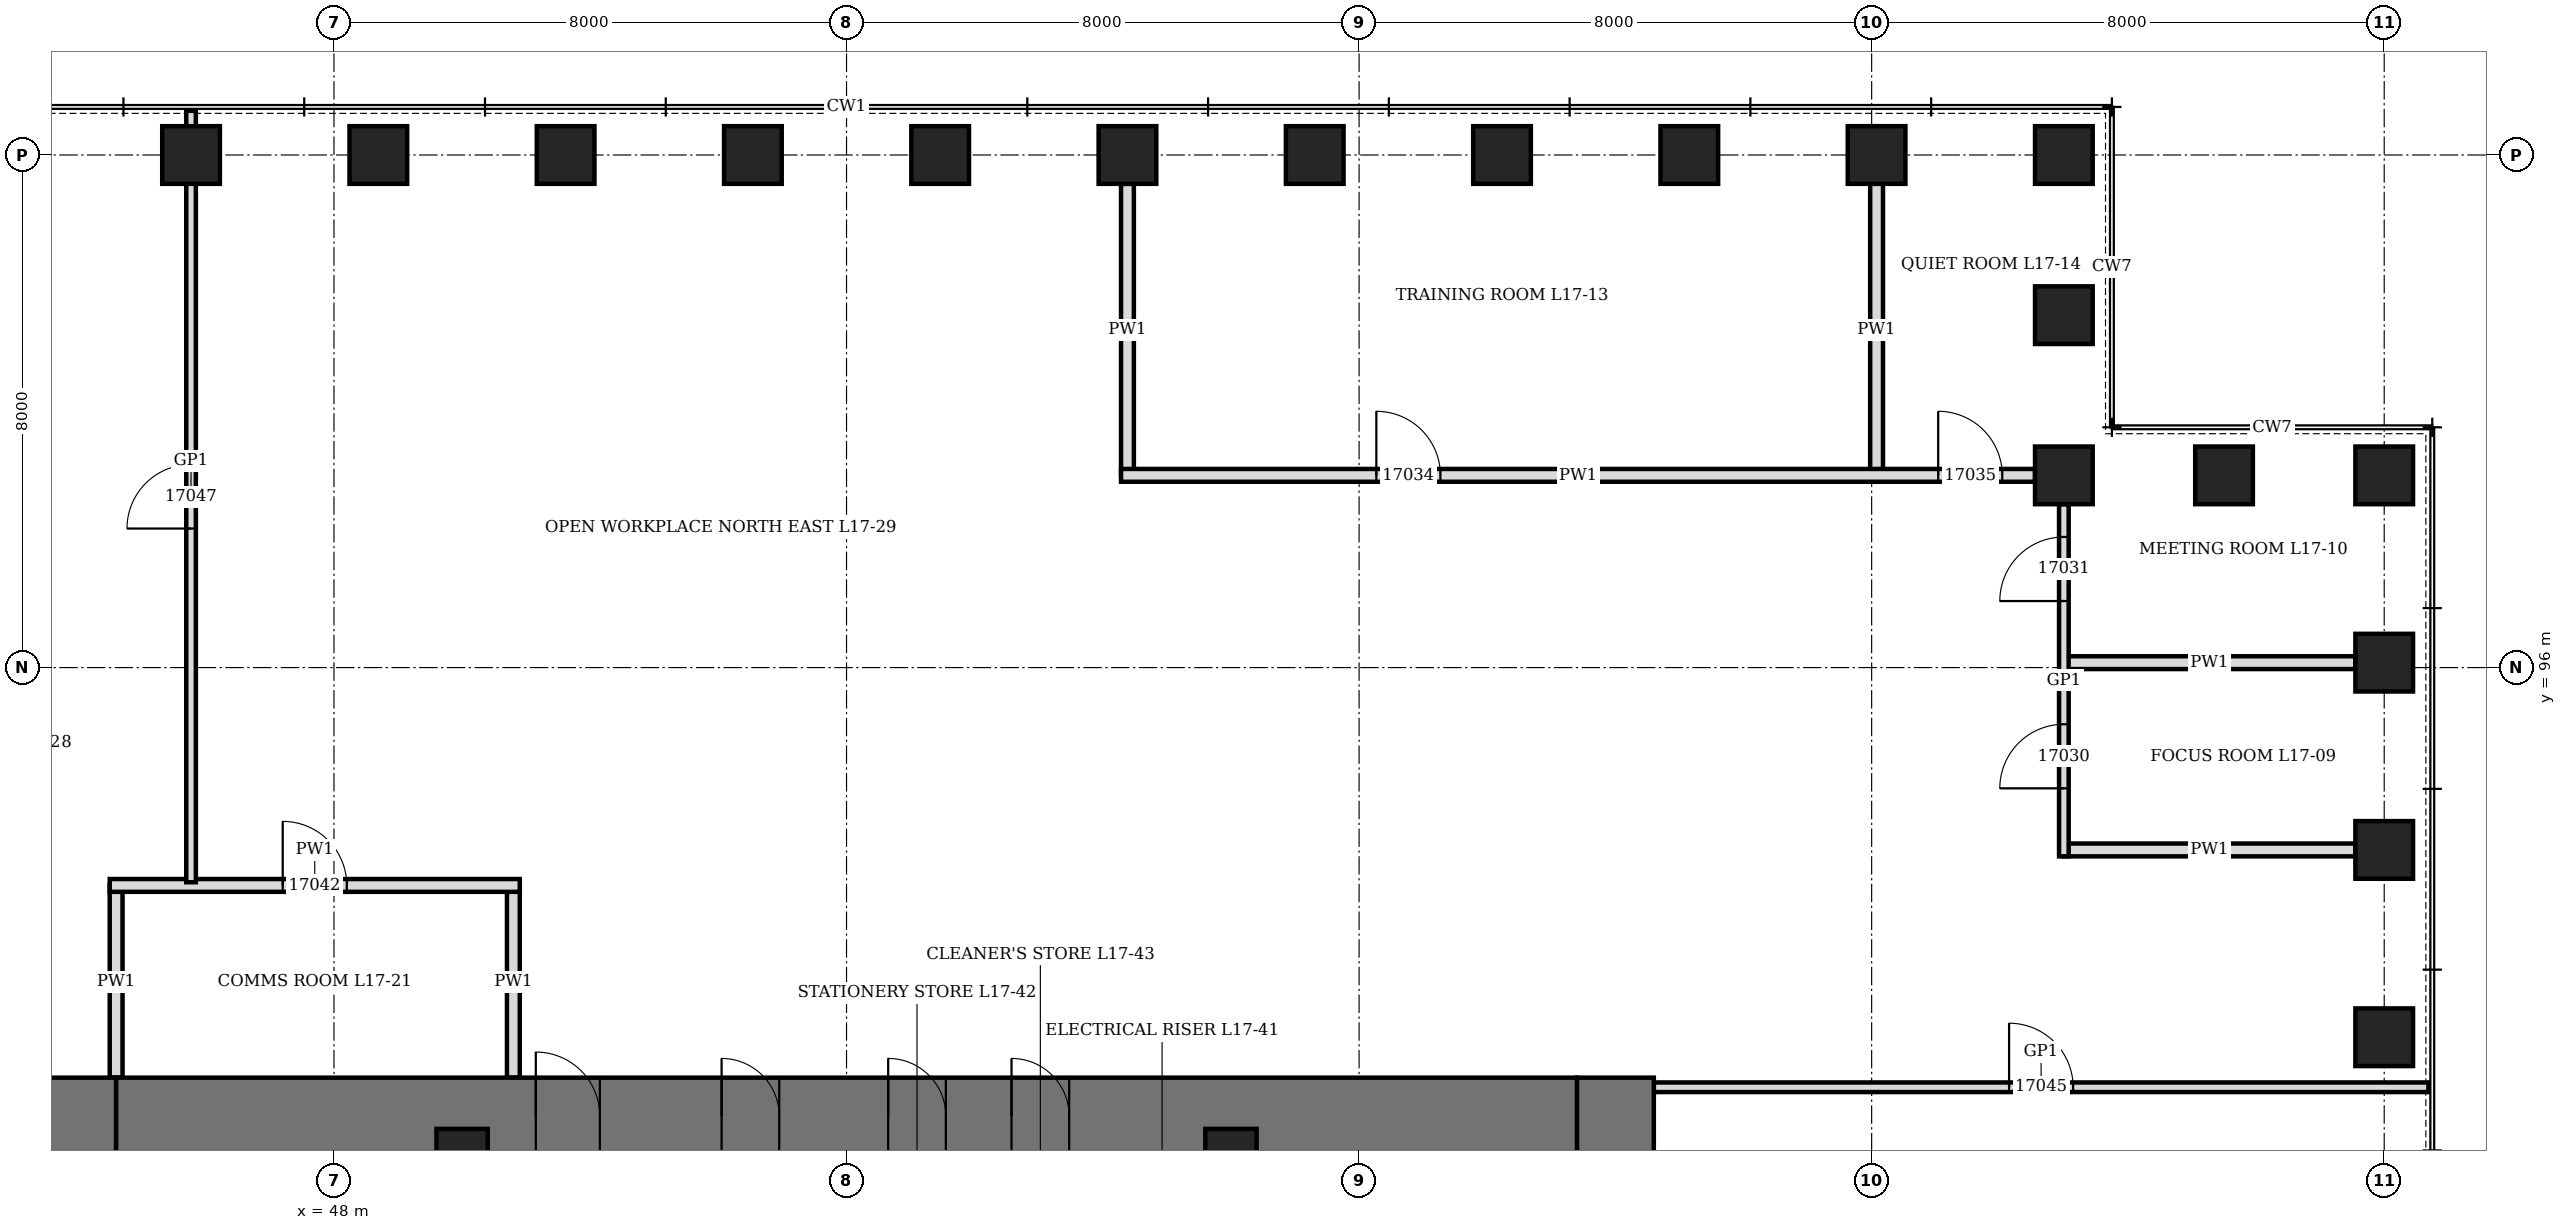
"""IFC4 building model, lengths in metres.
Left out: names, types, materials, properties, quantities, classifications, styles, units other than length and angle.
Written with IfcOpenShell. Run it as: python <this file> out.ifc"""

import sys

from ifc_helpers import new_model, si_unit, direction, frame, frame_2d, origin, origin_2d, place, context, subcontext, project, spatial, rectangle, hollow_rectangle, extrude, element, fill, save


model = new_model("IFC4")
c1 = context("Model", 3, precision=1e-05, world=origin(), true_north=direction((0.0, 1.0)))
c2 = subcontext(c1, "Body", "Model", "MODEL_VIEW")
j1 = project(units=[si_unit("LENGTHUNIT", "METRE"), si_unit("PLANEANGLEUNIT", "RADIAN")], contexts=[c1])
p1 = place(None, origin())
s1 = spatial("IfcSite", under=j1, at=p1, CompositionType="ELEMENT")
p2 = place(p1, origin())
s2 = spatial("IfcBuilding", under=s1, at=p2, CompositionType="ELEMENT")
p3 = place(p2, frame((0.0, 0.0, 81.1)))
s3 = spatial("IfcBuildingStorey", under=s2, at=p3, CompositionType="ELEMENT", Elevation=81.1)
for number, where, z_axis, x_axis in (
    (1, (80.0, 90.231, 0.0), (0.0, 0.0, 1.0), (0.0, 1.0, 0.0)),
    (2, (80.0, 93.154, 0.0), (0.0, 0.0, 1.0), (0.0, 1.0, 0.0)),
    (3, (80.0, 96.077, 0.0), (0.0, 0.0, 1.0), (0.0, 1.0, 0.0)),
    (4, (80.0, 99.0, 0.0), (0.0, 0.0, 1.0), (1.0, 0.0, 0.0)),
    (5, (77.5, 99.0, 0.0), (0.0, 0.0, 1.0), (1.0, 0.0, 0.0)),
    (6, (75.0, 99.0, 0.0), (0.0, 0.0, 1.0), (0.0, 1.0, 0.0)),
    (7, (75.0, 101.5, 0.0), (0.0, 0.0, 1.0), (0.0, 1.0, 0.0)),
    (8, (75.0, 104.0, 0.0), (0.0, 0.0, 1.0), (1.0, 0.0, 0.0)),
    (9, (72.077, 104.0, 0.0), (0.0, 0.0, 1.0), (1.0, 0.0, 0.0)),
    (10, (69.154, 104.0, 0.0), (0.0, 0.0, 1.0), (1.0, 0.0, 0.0)),
    (11, (66.231, 104.0, 0.0), (0.0, 0.0, 1.0), (1.0, 0.0, 0.0)),
    (12, (63.308, 104.0, 0.0), (0.0, 0.0, 1.0), (1.0, 0.0, 0.0)),
    (13, (60.385, 104.0, 0.0), (0.0, 0.0, 1.0), (1.0, 0.0, 0.0)),
    (14, (57.461, 104.0, 0.0), (0.0, 0.0, 1.0), (1.0, 0.0, 0.0)),
    (15, (54.539, 104.0, 0.0), (0.0, 0.0, 1.0), (1.0, 0.0, 0.0)),
    (16, (51.615, 104.0, 0.0), (0.0, 0.0, 1.0), (1.0, 0.0, 0.0)),
    (17, (48.692, 104.0, 0.0), (0.0, 0.0, 1.0), (1.0, 0.0, 0.0)),
    (18, (45.769, 104.0, 0.0), (0.0, 0.0, 1.0), (1.0, 0.0, 0.0)),
):
    element("IfcColumn", number, at=place(p3, frame(where, z_axis=z_axis, x_axis=x_axis)), inside=s3, PredefinedType="COLUMN", context=c2, shape_type="SweptSolid", body=[
        extrude(hollow_rectangle(XDim=0.9, YDim=0.9, WallThickness=0.12, at=origin_2d()), origin(), (0.0, 0.0, 1.0), 4.2),
    ])
p4 = place(p3, frame((44.0, 70.4, 0.0), z_axis=(0.0, 0.0, 1.0), x_axis=(0.0, 1.0, 0.0)))
e19 = element("IfcWall", 19, at=p4, inside=s3, PredefinedType="SHEAR", context=c2, shape_type="SweptSolid", body=[
    extrude(rectangle(XDim=19.2, YDim=1.2, at=frame_2d((9.6, 0.0))), origin(), (0.0, 0.0, 1.0), 4.2),
])
p5 = place(p4, frame((8.6, 0.0, 0.0)))
e20 = element("IfcOpeningElement", 20, at=p5, cuts=e19, PredefinedType="OPENING", context=c2, shape_type="SweptSolid", body=[
    extrude(rectangle(XDim=2.0, YDim=2.4, at=frame_2d((1.0, 1.2))), frame((0.0, 0.61, 0.0), z_axis=(0.0, -1.0, 0.0), x_axis=(1.0, 0.0, 0.0)), (0.0, 0.0, 1.0), 1.22),
])
p6 = place(p3, frame((68.0, 70.4, 0.0), z_axis=(0.0, 0.0, 1.0), x_axis=(0.0, 1.0, 0.0)))
e21 = element("IfcWall", 21, at=p6, inside=s3, PredefinedType="SHEAR", context=c2, shape_type="SweptSolid", body=[
    extrude(rectangle(XDim=19.2, YDim=1.2, at=frame_2d((9.6, 0.0))), origin(), (0.0, 0.0, 1.0), 4.2),
])
p7 = place(p6, frame((8.6, 0.0, 0.0)))
e22 = element("IfcOpeningElement", 22, at=p7, cuts=e21, PredefinedType="OPENING", context=c2, shape_type="SweptSolid", body=[
    extrude(rectangle(XDim=2.0, YDim=2.4, at=frame_2d((1.0, 1.2))), frame((0.0, 0.61, 0.0), z_axis=(0.0, -1.0, 0.0), x_axis=(1.0, 0.0, 0.0)), (0.0, 0.0, 1.0), 1.22),
])
p8 = place(p3, frame((44.6, 89.0, 0.0), z_axis=(0.0, 0.0, 1.0), x_axis=(1.0, 0.0, 0.0)))
e23 = element("IfcWall", 23, at=p8, inside=s3, PredefinedType="SHEAR", context=c2, shape_type="SweptSolid", body=[
    extrude(rectangle(XDim=22.8, YDim=1.2, at=frame_2d((11.4, 0.0))), origin(), (0.0, 0.0, 1.0), 4.2),
])
p9 = place(p8, frame((6.55, 0.0, 0.0)))
e24 = element("IfcOpeningElement", 24, at=p9, cuts=e23, PredefinedType="OPENING", context=c2, shape_type="SweptSolid", body=[
    extrude(rectangle(XDim=1.0, YDim=2.1, at=frame_2d((0.5, 1.05))), frame((0.0, 0.61, 0.0), z_axis=(0.0, -1.0, 0.0), x_axis=(1.0, 0.0, 0.0)), (0.0, 0.0, 1.0), 1.22),
])
p10 = place(p8, frame((9.45, 0.0, 0.0)))
e25 = element("IfcOpeningElement", 25, at=p10, cuts=e23, PredefinedType="OPENING", context=c2, shape_type="SweptSolid", body=[
    extrude(rectangle(XDim=0.9, YDim=2.1, at=frame_2d((0.45, 1.05))), frame((0.0, 0.61, 0.0), z_axis=(0.0, -1.0, 0.0), x_axis=(1.0, 0.0, 0.0)), (0.0, 0.0, 1.0), 1.22),
])
p11 = place(p8, frame((12.05, 0.0, 0.0)))
e26 = element("IfcOpeningElement", 26, at=p11, cuts=e23, PredefinedType="OPENING", context=c2, shape_type="SweptSolid", body=[
    extrude(rectangle(XDim=0.9, YDim=2.1, at=frame_2d((0.45, 1.05))), frame((0.0, 0.61, 0.0), z_axis=(0.0, -1.0, 0.0), x_axis=(1.0, 0.0, 0.0)), (0.0, 0.0, 1.0), 1.22),
])
p12 = place(p8, frame((13.975, 0.0, 0.0)))
e27 = element("IfcOpeningElement", 27, at=p12, cuts=e23, PredefinedType="OPENING", context=c2, shape_type="SweptSolid", body=[
    extrude(rectangle(XDim=0.9, YDim=2.1, at=frame_2d((0.45, 1.05))), frame((0.0, 0.61, 0.0), z_axis=(0.0, -1.0, 0.0), x_axis=(1.0, 0.0, 0.0)), (0.0, 0.0, 1.0), 1.22),
])
for number, where, z_axis, x_axis in (
    (28, (50.0, 88.4, 0.0), (0.0, 0.0, 1.0), (1.0, 0.0, 0.0)),
    (29, (62.0, 88.4, 0.0), (0.0, 0.0, 1.0), (1.0, 0.0, 0.0)),
):
    element("IfcColumn", number, at=place(p3, frame(where, z_axis=z_axis, x_axis=x_axis)), inside=s3, PredefinedType="COLUMN", context=c2, shape_type="SweptSolid", body=[
        extrude(hollow_rectangle(XDim=0.8, YDim=0.8, WallThickness=0.1, at=origin_2d()), origin(), (0.0, 0.0, 1.0), 4.2),
    ])
for number, where, z_axis, x_axis in (
    (30, (75.0, 93.154, 0.0), (0.0, 0.0, 1.0), (1.0, 0.0, 0.0)),
    (31, (75.0, 96.077, 0.0), (0.0, 0.0, 1.0), (1.0, 0.0, 0.0)),
):
    element("IfcWall", number, at=place(p3, frame(where, z_axis=z_axis, x_axis=x_axis)), inside=s3, PredefinedType="PARTITIONING", context=c2, shape_type="SweptSolid", body=[
        extrude(rectangle(XDim=4.55, YDim=0.2, at=frame_2d((2.275, 0.0))), origin(), (0.0, 0.0, 1.0), 3.428),
    ])
p13 = place(p3, frame((60.385, 99.0, 0.0), z_axis=(0.0, 0.0, 1.0), x_axis=(0.0, 1.0, 0.0)))
e32 = element("IfcWall", 32, at=p13, inside=s3, PredefinedType="PARTITIONING", context=c2, shape_type="SweptSolid", body=[
    extrude(rectangle(XDim=4.55, YDim=0.2, at=frame_2d((2.275, 0.0))), origin(), (0.0, 0.0, 1.0), 3.278),
])
p14 = place(p3, frame((72.077, 99.0, 0.0), z_axis=(0.0, 0.0, 1.0), x_axis=(0.0, 1.0, 0.0)))
e33 = element("IfcWall", 33, at=p14, inside=s3, PredefinedType="PARTITIONING", context=c2, shape_type="SweptSolid", body=[
    extrude(rectangle(XDim=4.55, YDim=0.2, at=frame_2d((2.275, 0.0))), origin(), (0.0, 0.0, 1.0), 3.428),
])
for number, where, z_axis, x_axis in (
    (34, (44.6, 89.6, 0.0), (0.0, 0.0, 1.0), (0.0, 1.0, 0.0)),
    (35, (50.8, 89.6, 0.0), (0.0, 0.0, 1.0), (0.0, 1.0, 0.0)),
):
    element("IfcWall", number, at=place(p3, frame(where, z_axis=z_axis, x_axis=x_axis)), inside=s3, PredefinedType="PARTITIONING", context=c2, shape_type="SweptSolid", body=[
        extrude(rectangle(XDim=3.0, YDim=0.2, at=frame_2d((1.5, 0.0))), origin(), (0.0, 0.0, 1.0), 4.04),
    ])
p15 = place(p3, frame((68.6, 89.45, 0.0), z_axis=(0.0, 0.0, 1.0), x_axis=(1.0, 0.0, 0.0)))
e36 = element("IfcWall", 36, at=p15, inside=s3, PredefinedType="PARTITIONING", context=c2, shape_type="SweptSolid", body=[
    extrude(rectangle(XDim=12.09, YDim=0.15, at=frame_2d((6.045, 0.0))), origin(), (0.0, 0.0, 1.0), 4.04),
])
p16 = place(p15, frame((5.545, 0.0, 0.0)))
e37 = element("IfcOpeningElement", 37, at=p16, cuts=e36, PredefinedType="OPENING", context=c2, shape_type="SweptSolid", body=[
    extrude(rectangle(XDim=1.0, YDim=2.4, at=frame_2d((0.5, 1.2))), frame((0.0, 0.085, 0.0), z_axis=(0.0, -1.0, 0.0), x_axis=(1.0, 0.0, 0.0)), (0.0, 0.0, 1.0), 0.17),
])
p17 = place(p3, frame((44.5, 92.6, 0.0), z_axis=(0.0, 0.0, 1.0), x_axis=(1.0, 0.0, 0.0)))
e38 = element("IfcWall", 38, at=p17, inside=s3, PredefinedType="PARTITIONING", context=c2, shape_type="SweptSolid", body=[
    extrude(rectangle(XDim=6.4, YDim=0.2, at=frame_2d((3.2, 0.0))), origin(), (0.0, 0.0, 1.0), 4.04),
])
p18 = place(p17, frame((2.7, 0.0, 0.0)))
e39 = element("IfcOpeningElement", 39, at=p18, cuts=e38, PredefinedType="OPENING", context=c2, shape_type="SweptSolid", body=[
    extrude(rectangle(XDim=1.0, YDim=2.1, at=frame_2d((0.5, 1.05))), frame((0.0, 0.11, 0.0), z_axis=(0.0, -1.0, 0.0), x_axis=(1.0, 0.0, 0.0)), (0.0, 0.0, 1.0), 0.22),
])
p19 = place(p3, frame((60.285, 99.0, 0.0), z_axis=(0.0, 0.0, 1.0), x_axis=(1.0, 0.0, 0.0)))
e40 = element("IfcWall", 40, at=p19, inside=s3, PredefinedType="PARTITIONING", context=c2, shape_type="SweptSolid", body=[
    extrude(rectangle(XDim=14.265, YDim=0.2, at=frame_2d((7.133, 0.0))), origin(), (0.0, 0.0, 1.0), 4.04),
])
p20 = place(p19, frame((3.985, 0.0, 0.0)))
e41 = element("IfcOpeningElement", 41, at=p20, cuts=e40, PredefinedType="OPENING", context=c2, shape_type="SweptSolid", body=[
    extrude(rectangle(XDim=1.0, YDim=2.1, at=frame_2d((0.5, 1.05))), frame((0.0, 0.11, 0.0), z_axis=(0.0, -1.0, 0.0), x_axis=(1.0, 0.0, 0.0)), (0.0, 0.0, 1.0), 0.22),
])
p21 = place(p19, frame((12.754, 0.0, 0.0)))
e42 = element("IfcOpeningElement", 42, at=p21, cuts=e40, PredefinedType="OPENING", context=c2, shape_type="SweptSolid", body=[
    extrude(rectangle(XDim=1.0, YDim=2.1, at=frame_2d((0.5, 1.05))), frame((0.0, 0.11, 0.0), z_axis=(0.0, -1.0, 0.0), x_axis=(1.0, 0.0, 0.0)), (0.0, 0.0, 1.0), 0.22),
])
p22 = place(p3, frame((45.769, 92.65, 0.0), z_axis=(0.0, 0.0, 1.0), x_axis=(0.0, 1.0, 0.0)))
e43 = element("IfcWall", 43, at=p22, inside=s3, PredefinedType="PARTITIONING", context=c2, shape_type="SweptSolid", body=[
    extrude(rectangle(XDim=12.04, YDim=0.15, at=frame_2d((6.02, 0.0))), origin(), (0.0, 0.0, 1.0), 3.278),
])
p23 = place(p22, frame((5.52, 0.0, 0.0)))
e44 = element("IfcOpeningElement", 44, at=p23, cuts=e43, PredefinedType="OPENING", context=c2, shape_type="SweptSolid", body=[
    extrude(rectangle(XDim=1.0, YDim=2.4, at=frame_2d((0.5, 1.2))), frame((0.0, 0.085, 0.0), z_axis=(0.0, -1.0, 0.0), x_axis=(1.0, 0.0, 0.0)), (0.0, 0.0, 1.0), 0.17),
])
p24 = place(p3, frame((75.0, 93.054, 0.0), z_axis=(0.0, 0.0, 1.0), x_axis=(0.0, 1.0, 0.0)))
e45 = element("IfcWall", 45, at=p24, inside=s3, PredefinedType="PARTITIONING", context=c2, shape_type="SweptSolid", body=[
    extrude(rectangle(XDim=5.496, YDim=0.15, at=frame_2d((2.748, 0.0))), origin(), (0.0, 0.0, 1.0), 4.04),
])
p25 = place(p24, frame((1.062, 0.0, 0.0)))
e46 = element("IfcOpeningElement", 46, at=p25, cuts=e45, PredefinedType="OPENING", context=c2, shape_type="SweptSolid", body=[
    extrude(rectangle(XDim=1.0, YDim=2.4, at=frame_2d((0.5, 1.2))), frame((0.0, 0.085, 0.0), z_axis=(0.0, -1.0, 0.0), x_axis=(1.0, 0.0, 0.0)), (0.0, 0.0, 1.0), 0.17),
])
p26 = place(p24, frame((3.985, 0.0, 0.0)))
e47 = element("IfcOpeningElement", 47, at=p26, cuts=e45, PredefinedType="OPENING", context=c2, shape_type="SweptSolid", body=[
    extrude(rectangle(XDim=1.0, YDim=2.4, at=frame_2d((0.5, 1.2))), frame((0.0, 0.085, 0.0), z_axis=(0.0, -1.0, 0.0), x_axis=(1.0, 0.0, 0.0)), (0.0, 0.0, 1.0), 0.17),
])
p27 = place(p9, origin())
e48 = element("IfcDoor", 48, at=p27, inside=s3, OperationType="SINGLE_SWING_LEFT", PredefinedType="DOOR", context=c2, shape_type="SweptSolid", body=[
    extrude(rectangle(XDim=1.0, YDim=2.1, at=frame_2d((0.5, 1.05))), frame((0.0, 0.35, 0.0), z_axis=(0.0, -1.0, 0.0), x_axis=(1.0, 0.0, 0.0)), (0.0, 0.0, 1.0), 0.7),
])
fill(e24, e48)
p28 = place(p10, origin())
e49 = element("IfcDoor", 49, at=p28, inside=s3, OperationType="SINGLE_SWING_LEFT", PredefinedType="DOOR", context=c2, shape_type="SweptSolid", body=[
    extrude(rectangle(XDim=0.9, YDim=2.1, at=frame_2d((0.45, 1.05))), frame((0.0, 0.35, 0.0), z_axis=(0.0, -1.0, 0.0), x_axis=(1.0, 0.0, 0.0)), (0.0, 0.0, 1.0), 0.7),
])
fill(e25, e49)
p29 = place(p11, origin())
e50 = element("IfcDoor", 50, at=p29, inside=s3, OperationType="SINGLE_SWING_LEFT", PredefinedType="DOOR", context=c2, shape_type="SweptSolid", body=[
    extrude(rectangle(XDim=0.9, YDim=2.1, at=frame_2d((0.45, 1.05))), frame((0.0, 0.35, 0.0), z_axis=(0.0, -1.0, 0.0), x_axis=(1.0, 0.0, 0.0)), (0.0, 0.0, 1.0), 0.7),
])
fill(e26, e50)
p30 = place(p12, origin())
e51 = element("IfcDoor", 51, at=p30, inside=s3, OperationType="SINGLE_SWING_LEFT", PredefinedType="DOOR", context=c2, shape_type="SweptSolid", body=[
    extrude(rectangle(XDim=0.9, YDim=2.1, at=frame_2d((0.45, 1.05))), frame((0.0, 0.35, 0.0), z_axis=(0.0, -1.0, 0.0), x_axis=(1.0, 0.0, 0.0)), (0.0, 0.0, 1.0), 0.7),
])
fill(e27, e51)
p31 = place(p25, origin())
e52 = element("IfcDoor", 52, at=p31, inside=s3, OperationType="SINGLE_SWING_RIGHT", PredefinedType="DOOR", context=c2, shape_type="SweptSolid", body=[
    extrude(rectangle(XDim=1.0, YDim=2.4, at=frame_2d((0.5, 1.2))), frame((0.0, 0.075, 0.0), z_axis=(0.0, -1.0, 0.0), x_axis=(1.0, 0.0, 0.0)), (0.0, 0.0, 1.0), 0.149),
])
fill(e46, e52)
p32 = place(p26, origin())
e53 = element("IfcDoor", 53, at=p32, inside=s3, OperationType="SINGLE_SWING_RIGHT", PredefinedType="DOOR", context=c2, shape_type="SweptSolid", body=[
    extrude(rectangle(XDim=1.0, YDim=2.4, at=frame_2d((0.5, 1.2))), frame((0.0, 0.075, 0.0), z_axis=(0.0, -1.0, 0.0), x_axis=(1.0, 0.0, 0.0)), (0.0, 0.0, 1.0), 0.149),
])
fill(e47, e53)
p33 = place(p20, origin())
e54 = element("IfcDoor", 54, at=p33, inside=s3, OperationType="SINGLE_SWING_LEFT", PredefinedType="DOOR", context=c2, shape_type="SweptSolid", body=[
    extrude(rectangle(XDim=1.0, YDim=2.1, at=frame_2d((0.5, 1.05))), frame((0.0, 0.1, 0.0), z_axis=(0.0, -1.0, 0.0), x_axis=(1.0, 0.0, 0.0)), (0.0, 0.0, 1.0), 0.199),
])
fill(e41, e54)
p34 = place(p21, origin())
e55 = element("IfcDoor", 55, at=p34, inside=s3, OperationType="SINGLE_SWING_LEFT", PredefinedType="DOOR", context=c2, shape_type="SweptSolid", body=[
    extrude(rectangle(XDim=1.0, YDim=2.1, at=frame_2d((0.5, 1.05))), frame((0.0, 0.1, 0.0), z_axis=(0.0, -1.0, 0.0), x_axis=(1.0, 0.0, 0.0)), (0.0, 0.0, 1.0), 0.199),
])
fill(e42, e55)
p35 = place(p18, origin())
e56 = element("IfcDoor", 56, at=p35, inside=s3, OperationType="SINGLE_SWING_LEFT", PredefinedType="DOOR", context=c2, shape_type="SweptSolid", body=[
    extrude(rectangle(XDim=1.0, YDim=2.1, at=frame_2d((0.5, 1.05))), frame((0.0, 0.1, 0.0), z_axis=(0.0, -1.0, 0.0), x_axis=(1.0, 0.0, 0.0)), (0.0, 0.0, 1.0), 0.199),
])
fill(e39, e56)
p36 = place(p16, origin())
e57 = element("IfcDoor", 57, at=p36, inside=s3, OperationType="SINGLE_SWING_RIGHT", PredefinedType="DOOR", context=c2, shape_type="SweptSolid", body=[
    extrude(rectangle(XDim=1.0, YDim=2.4, at=frame_2d((0.5, 1.2))), frame((0.0, 0.075, 0.0), z_axis=(0.0, -1.0, 0.0), x_axis=(1.0, 0.0, 0.0)), (0.0, 0.0, 1.0), 0.149),
])
fill(e37, e57)
p37 = place(p23, origin())
e58 = element("IfcDoor", 58, at=p37, inside=s3, OperationType="SINGLE_SWING_RIGHT", PredefinedType="DOOR", context=c2, shape_type="SweptSolid", body=[
    extrude(rectangle(XDim=1.0, YDim=2.4, at=frame_2d((0.5, 1.2))), frame((0.0, 0.075, 0.0), z_axis=(0.0, -1.0, 0.0), x_axis=(1.0, 0.0, 0.0)), (0.0, 0.0, 1.0), 0.149),
])
fill(e44, e58)
save(model, sys.argv[1])
